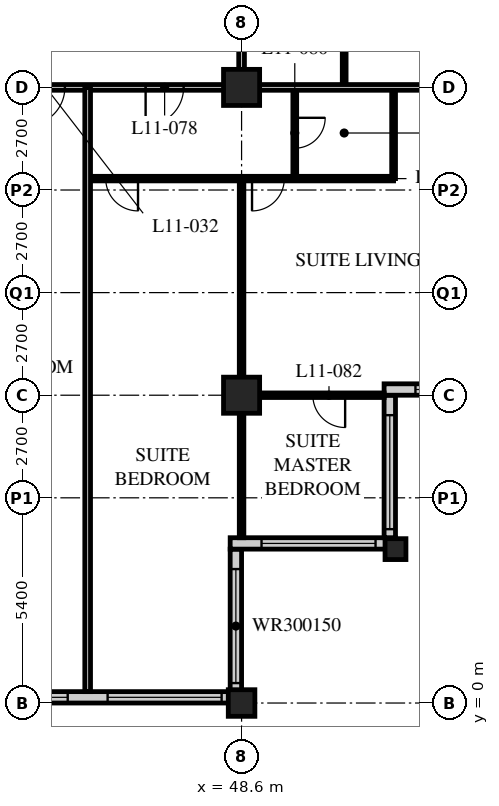
"""IFC4 building model, lengths in metres.
Left out: names, types, materials, properties, quantities, classifications, styles, units other than length and angle.
Written with IfcOpenShell. Run it as: python <this file> out.ifc"""

import sys

from ifc_helpers import new_model, si_unit, direction, frame, frame_2d, origin, origin_2d, place, context, subcontext, project, spatial, rectangle, hollow_rectangle, extrude, element, fill, save


model = new_model("IFC4")
c1 = context("Model", 3, precision=1e-05, world=origin(), true_north=direction((0.0, 1.0)))
c2 = subcontext(c1, "Body", "Model", "MODEL_VIEW")
j1 = project(units=[si_unit("LENGTHUNIT", "METRE"), si_unit("PLANEANGLEUNIT", "RADIAN")], contexts=[c1])
p1 = place(None, origin())
s1 = spatial("IfcSite", under=j1, at=p1, CompositionType="ELEMENT")
p2 = place(p1, origin())
s2 = spatial("IfcBuilding", under=s1, at=p2, CompositionType="ELEMENT")
p3 = place(p2, frame((0.0, 0.0, 50.0)))
s3 = spatial("IfcBuildingStorey", under=s2, at=p3, CompositionType="ELEMENT", Elevation=50.0)
p4 = place(p3, frame((48.6, 0.0, 0.0), z_axis=(0.0, 0.0, 1.0), x_axis=(1.0, 0.0, 0.0)))
e1 = element("IfcColumn", 1, at=p4, inside=s3, PredefinedType="COLUMN", context=c2, shape_type="SweptSolid", body=[
    extrude(hollow_rectangle(XDim=0.7, YDim=0.7, WallThickness=0.06, at=origin_2d()), origin(), (0.0, 0.0, 1.0), 3.4),
])
for number, where, z_axis, x_axis in (
    (2, (48.6, 8.1, 0.0), (0.0, 0.0, 1.0), (1.0, 0.0, 0.0)),
    (3, (48.6, 16.2, 0.0), (0.0, 0.0, 1.0), (1.0, 0.0, 0.0)),
):
    element("IfcColumn", number, at=place(p3, frame(where, z_axis=z_axis, x_axis=x_axis)), inside=s3, PredefinedType="COLUMN", context=c2, shape_type="SweptSolid", body=[
        extrude(hollow_rectangle(XDim=0.95, YDim=0.95, WallThickness=0.095, at=origin_2d()), origin(), (0.0, 0.0, 1.0), 3.4),
    ])
p5 = place(p3, frame((52.65, 4.05, 0.0), z_axis=(0.0, 0.0, 1.0), x_axis=(1.0, 0.0, 0.0)))
e4 = element("IfcColumn", 4, at=p5, inside=s3, PredefinedType="COLUMN", context=c2, shape_type="SweptSolid", body=[
    extrude(hollow_rectangle(XDim=0.55, YDim=0.55, WallThickness=0.05, at=origin_2d()), origin(), (0.0, 0.0, 1.0), 3.4),
])
p6 = place(p3, frame((8.4, 0.15, 0.0), z_axis=(0.0, 0.0, 1.0), x_axis=(1.0, 0.0, 0.0)))
e5 = element("IfcWall", 5, at=p6, inside=s3, PredefinedType="SOLIDWALL", context=c2, shape_type="SweptSolid", body=[
    extrude(rectangle(XDim=40.2, YDim=0.3, at=frame_2d((20.1, 0.0))), origin(), (0.0, 0.0, 1.0), 3.19),
])
p7 = place(p6, frame((0.225, 0.0, 0.9)))
e6 = element("IfcOpeningElement", 6, at=p7, cuts=e5, PredefinedType="OPENING", context=c2, shape_type="SweptSolid", body=[
    extrude(rectangle(XDim=3.0, YDim=2.0, at=frame_2d((1.5, 1.0))), frame((0.0, 0.16, 0.0), z_axis=(0.0, -1.0, 0.0), x_axis=(1.0, 0.0, 0.0)), (0.0, 0.0, 1.0), 0.32),
])
p8 = place(p6, frame((4.275, 0.0, 0.9)))
e7 = element("IfcOpeningElement", 7, at=p8, cuts=e5, PredefinedType="OPENING", context=c2, shape_type="SweptSolid", body=[
    extrude(rectangle(XDim=3.0, YDim=2.0, at=frame_2d((1.5, 1.0))), frame((0.0, 0.16, 0.0), z_axis=(0.0, -1.0, 0.0), x_axis=(1.0, 0.0, 0.0)), (0.0, 0.0, 1.0), 0.32),
])
p9 = place(p6, frame((8.325, 0.0, 0.9)))
e8 = element("IfcOpeningElement", 8, at=p9, cuts=e5, PredefinedType="OPENING", context=c2, shape_type="SweptSolid", body=[
    extrude(rectangle(XDim=3.0, YDim=2.0, at=frame_2d((1.5, 1.0))), frame((0.0, 0.16, 0.0), z_axis=(0.0, -1.0, 0.0), x_axis=(1.0, 0.0, 0.0)), (0.0, 0.0, 1.0), 0.32),
])
p10 = place(p6, frame((12.375, 0.0, 0.9)))
e9 = element("IfcOpeningElement", 9, at=p10, cuts=e5, PredefinedType="OPENING", context=c2, shape_type="SweptSolid", body=[
    extrude(rectangle(XDim=3.0, YDim=2.0, at=frame_2d((1.5, 1.0))), frame((0.0, 0.16, 0.0), z_axis=(0.0, -1.0, 0.0), x_axis=(1.0, 0.0, 0.0)), (0.0, 0.0, 1.0), 0.32),
])
p11 = place(p6, frame((16.425, 0.0, 0.9)))
e10 = element("IfcOpeningElement", 10, at=p11, cuts=e5, PredefinedType="OPENING", context=c2, shape_type="SweptSolid", body=[
    extrude(rectangle(XDim=3.0, YDim=2.0, at=frame_2d((1.5, 1.0))), frame((0.0, 0.16, 0.0), z_axis=(0.0, -1.0, 0.0), x_axis=(1.0, 0.0, 0.0)), (0.0, 0.0, 1.0), 0.32),
])
p12 = place(p6, frame((20.475, 0.0, 0.9)))
e11 = element("IfcOpeningElement", 11, at=p12, cuts=e5, PredefinedType="OPENING", context=c2, shape_type="SweptSolid", body=[
    extrude(rectangle(XDim=3.0, YDim=2.0, at=frame_2d((1.5, 1.0))), frame((0.0, 0.16, 0.0), z_axis=(0.0, -1.0, 0.0), x_axis=(1.0, 0.0, 0.0)), (0.0, 0.0, 1.0), 0.32),
])
p13 = place(p6, frame((24.525, 0.0, 0.9)))
e12 = element("IfcOpeningElement", 12, at=p13, cuts=e5, PredefinedType="OPENING", context=c2, shape_type="SweptSolid", body=[
    extrude(rectangle(XDim=3.0, YDim=2.0, at=frame_2d((1.5, 1.0))), frame((0.0, 0.16, 0.0), z_axis=(0.0, -1.0, 0.0), x_axis=(1.0, 0.0, 0.0)), (0.0, 0.0, 1.0), 0.32),
])
p14 = place(p6, frame((28.575, 0.0, 0.9)))
e13 = element("IfcOpeningElement", 13, at=p14, cuts=e5, PredefinedType="OPENING", context=c2, shape_type="SweptSolid", body=[
    extrude(rectangle(XDim=3.0, YDim=2.0, at=frame_2d((1.5, 1.0))), frame((0.0, 0.16, 0.0), z_axis=(0.0, -1.0, 0.0), x_axis=(1.0, 0.0, 0.0)), (0.0, 0.0, 1.0), 0.32),
])
p15 = place(p6, frame((32.625, 0.0, 0.9)))
e14 = element("IfcOpeningElement", 14, at=p15, cuts=e5, PredefinedType="OPENING", context=c2, shape_type="SweptSolid", body=[
    extrude(rectangle(XDim=3.0, YDim=2.0, at=frame_2d((1.5, 1.0))), frame((0.0, 0.16, 0.0), z_axis=(0.0, -1.0, 0.0), x_axis=(1.0, 0.0, 0.0)), (0.0, 0.0, 1.0), 0.32),
])
p16 = place(p6, frame((36.675, 0.0, 0.9)))
e15 = element("IfcOpeningElement", 15, at=p16, cuts=e5, PredefinedType="OPENING", context=c2, shape_type="SweptSolid", body=[
    extrude(rectangle(XDim=3.0, YDim=2.0, at=frame_2d((1.5, 1.0))), frame((0.0, 0.16, 0.0), z_axis=(0.0, -1.0, 0.0), x_axis=(1.0, 0.0, 0.0)), (0.0, 0.0, 1.0), 0.32),
])
p17 = place(p3, frame((48.45, 0.3, 0.0), z_axis=(0.0, 0.0, 1.0), x_axis=(0.0, 1.0, 0.0)))
e16 = element("IfcWall", 16, at=p17, inside=s3, PredefinedType="SOLIDWALL", context=c2, shape_type="SweptSolid", body=[
    extrude(rectangle(XDim=3.75, YDim=0.3, at=frame_2d((1.875, 0.0))), origin(), (0.0, 0.0, 1.0), 3.19),
])
p18 = place(p17, frame((0.225, 0.0, 0.9)))
e17 = element("IfcOpeningElement", 17, at=p18, cuts=e16, PredefinedType="OPENING", context=c2, shape_type="SweptSolid", body=[
    extrude(rectangle(XDim=3.0, YDim=1.5, at=frame_2d((1.5, 0.75))), frame((0.0, 0.16, 0.0), z_axis=(0.0, -1.0, 0.0), x_axis=(1.0, 0.0, 0.0)), (0.0, 0.0, 1.0), 0.32),
])
p19 = place(p3, frame((48.3, 4.2, 0.0), z_axis=(0.0, 0.0, 1.0), x_axis=(1.0, 0.0, 0.0)))
e18 = element("IfcWall", 18, at=p19, inside=s3, PredefinedType="SOLIDWALL", context=c2, shape_type="SweptSolid", body=[
    extrude(rectangle(XDim=4.35, YDim=0.3, at=frame_2d((2.175, 0.0))), origin(), (0.0, 0.0, 1.0), 3.19),
])
p20 = place(p19, frame((0.825, 0.0, 0.9)))
e19 = element("IfcOpeningElement", 19, at=p20, cuts=e18, PredefinedType="OPENING", context=c2, shape_type="SweptSolid", body=[
    extrude(rectangle(XDim=3.0, YDim=1.5, at=frame_2d((1.5, 0.75))), frame((0.0, 0.16, 0.0), z_axis=(0.0, -1.0, 0.0), x_axis=(1.0, 0.0, 0.0)), (0.0, 0.0, 1.0), 0.32),
])
p21 = place(p3, frame((52.5, 4.35, 0.0), z_axis=(0.0, 0.0, 1.0), x_axis=(0.0, 1.0, 0.0)))
e20 = element("IfcWall", 20, at=p21, inside=s3, PredefinedType="SOLIDWALL", context=c2, shape_type="SweptSolid", body=[
    extrude(rectangle(XDim=3.75, YDim=0.3, at=frame_2d((1.875, 0.0))), origin(), (0.0, 0.0, 1.0), 3.19),
])
p22 = place(p21, frame((0.225, 0.0, 0.9)))
e21 = element("IfcOpeningElement", 21, at=p22, cuts=e20, PredefinedType="OPENING", context=c2, shape_type="SweptSolid", body=[
    extrude(rectangle(XDim=3.0, YDim=1.5, at=frame_2d((1.5, 0.75))), frame((0.0, 0.16, 0.0), z_axis=(0.0, -1.0, 0.0), x_axis=(1.0, 0.0, 0.0)), (0.0, 0.0, 1.0), 0.32),
])
p23 = place(p3, frame((52.35, 8.25, 0.0), z_axis=(0.0, 0.0, 1.0), x_axis=(1.0, 0.0, 0.0)))
e22 = element("IfcWall", 22, at=p23, inside=s3, PredefinedType="SOLIDWALL", context=c2, shape_type="SweptSolid", body=[
    extrude(rectangle(XDim=4.35, YDim=0.3, at=frame_2d((2.175, 0.0))), origin(), (0.0, 0.0, 1.0), 3.19),
])
p24 = place(p23, frame((0.825, 0.0, 0.9)))
e23 = element("IfcOpeningElement", 23, at=p24, cuts=e22, PredefinedType="OPENING", context=c2, shape_type="SweptSolid", body=[
    extrude(rectangle(XDim=3.0, YDim=1.5, at=frame_2d((1.5, 0.75))), frame((0.0, 0.16, 0.0), z_axis=(0.0, -1.0, 0.0), x_axis=(1.0, 0.0, 0.0)), (0.0, 0.0, 1.0), 0.32),
])
p25 = place(p3, frame((8.1, 16.2, 0.0), z_axis=(0.0, 0.0, 1.0), x_axis=(1.0, 0.0, 0.0)))
e24 = element("IfcWall", 24, at=p25, inside=s3, PredefinedType="PARTITIONING", context=c2, shape_type="SweptSolid", body=[
    extrude(rectangle(XDim=40.5, YDim=0.15, at=frame_2d((20.25, 0.0))), origin(), (0.0, 0.0, 1.0), 2.578),
])
p26 = place(p25, frame((4.35, 0.0, 0.0)))
e25 = element("IfcOpeningElement", 25, at=p26, cuts=e24, PredefinedType="OPENING", context=c2, shape_type="SweptSolid", body=[
    extrude(rectangle(XDim=1.0, YDim=2.1, at=frame_2d((0.5, 1.05))), frame((0.0, 0.085, 0.0), z_axis=(0.0, -1.0, 0.0), x_axis=(1.0, 0.0, 0.0)), (0.0, 0.0, 1.0), 0.17),
])
p27 = place(p25, frame((10.85, 0.0, 0.0)))
e26 = element("IfcOpeningElement", 26, at=p27, cuts=e24, PredefinedType="OPENING", context=c2, shape_type="SweptSolid", body=[
    extrude(rectangle(XDim=1.0, YDim=2.1, at=frame_2d((0.5, 1.05))), frame((0.0, 0.085, 0.0), z_axis=(0.0, -1.0, 0.0), x_axis=(1.0, 0.0, 0.0)), (0.0, 0.0, 1.0), 0.17),
])
p28 = place(p25, frame((12.75, 0.0, 0.0)))
e27 = element("IfcOpeningElement", 27, at=p28, cuts=e24, PredefinedType="OPENING", context=c2, shape_type="SweptSolid", body=[
    extrude(rectangle(XDim=1.0, YDim=2.1, at=frame_2d((0.5, 1.05))), frame((0.0, 0.085, 0.0), z_axis=(0.0, -1.0, 0.0), x_axis=(1.0, 0.0, 0.0)), (0.0, 0.0, 1.0), 0.17),
])
p29 = place(p25, frame((18.95, 0.0, 0.0)))
e28 = element("IfcOpeningElement", 28, at=p29, cuts=e24, PredefinedType="OPENING", context=c2, shape_type="SweptSolid", body=[
    extrude(rectangle(XDim=1.0, YDim=2.1, at=frame_2d((0.5, 1.05))), frame((0.0, 0.085, 0.0), z_axis=(0.0, -1.0, 0.0), x_axis=(1.0, 0.0, 0.0)), (0.0, 0.0, 1.0), 0.17),
])
p30 = place(p25, frame((20.55, 0.0, 0.0)))
e29 = element("IfcOpeningElement", 29, at=p30, cuts=e24, PredefinedType="OPENING", context=c2, shape_type="SweptSolid", body=[
    extrude(rectangle(XDim=1.0, YDim=2.1, at=frame_2d((0.5, 1.05))), frame((0.0, 0.085, 0.0), z_axis=(0.0, -1.0, 0.0), x_axis=(1.0, 0.0, 0.0)), (0.0, 0.0, 1.0), 0.17),
])
p31 = place(p25, frame((27.05, 0.0, 0.0)))
e30 = element("IfcOpeningElement", 30, at=p31, cuts=e24, PredefinedType="OPENING", context=c2, shape_type="SweptSolid", body=[
    extrude(rectangle(XDim=1.0, YDim=2.1, at=frame_2d((0.5, 1.05))), frame((0.0, 0.085, 0.0), z_axis=(0.0, -1.0, 0.0), x_axis=(1.0, 0.0, 0.0)), (0.0, 0.0, 1.0), 0.17),
])
p32 = place(p25, frame((28.95, 0.0, 0.0)))
e31 = element("IfcOpeningElement", 31, at=p32, cuts=e24, PredefinedType="OPENING", context=c2, shape_type="SweptSolid", body=[
    extrude(rectangle(XDim=1.0, YDim=2.1, at=frame_2d((0.5, 1.05))), frame((0.0, 0.085, 0.0), z_axis=(0.0, -1.0, 0.0), x_axis=(1.0, 0.0, 0.0)), (0.0, 0.0, 1.0), 0.17),
])
p33 = place(p25, frame((34.85, 0.0, 0.0)))
e32 = element("IfcOpeningElement", 32, at=p33, cuts=e24, PredefinedType="OPENING", context=c2, shape_type="SweptSolid", body=[
    extrude(rectangle(XDim=1.0, YDim=2.1, at=frame_2d((0.5, 1.05))), frame((0.0, 0.085, 0.0), z_axis=(0.0, -1.0, 0.0), x_axis=(1.0, 0.0, 0.0)), (0.0, 0.0, 1.0), 0.17),
])
p34 = place(p25, frame((1.525, 0.0, 0.0)))
e33 = element("IfcOpeningElement", 33, at=p34, cuts=e24, PredefinedType="OPENING", context=c2, shape_type="SweptSolid", body=[
    extrude(rectangle(XDim=1.0, YDim=2.1, at=frame_2d((0.5, 1.05))), frame((0.0, 0.085, 0.0), z_axis=(0.0, -1.0, 0.0), x_axis=(1.0, 0.0, 0.0)), (0.0, 0.0, 1.0), 0.17),
])
p35 = place(p25, frame((37.975, 0.0, 0.0)))
e34 = element("IfcOpeningElement", 34, at=p35, cuts=e24, PredefinedType="OPENING", context=c2, shape_type="SweptSolid", body=[
    extrude(rectangle(XDim=1.0, YDim=2.1, at=frame_2d((0.5, 1.05))), frame((0.0, 0.085, 0.0), z_axis=(0.0, -1.0, 0.0), x_axis=(1.0, 0.0, 0.0)), (0.0, 0.0, 1.0), 0.17),
])
p36 = place(p3, frame((48.6, 16.2, 0.0), z_axis=(0.0, 0.0, 1.0), x_axis=(0.0, 1.0, 0.0)))
e35 = element("IfcWall", 35, at=p36, inside=s3, PredefinedType="PARTITIONING", context=c2, shape_type="SweptSolid", body=[
    extrude(rectangle(XDim=26.1, YDim=0.15, at=frame_2d((13.05, 0.0))), origin(), (0.0, 0.0, 1.0), 2.578),
])
p37 = place(p36, frame((2.75, 0.0, 0.0)))
e36 = element("IfcOpeningElement", 36, at=p37, cuts=e35, PredefinedType="OPENING", context=c2, shape_type="SweptSolid", body=[
    extrude(rectangle(XDim=1.0, YDim=2.1, at=frame_2d((0.5, 1.05))), frame((0.0, 0.085, 0.0), z_axis=(0.0, -1.0, 0.0), x_axis=(1.0, 0.0, 0.0)), (0.0, 0.0, 1.0), 0.17),
])
p38 = place(p36, frame((4.35, 0.0, 0.0)))
e37 = element("IfcOpeningElement", 37, at=p38, cuts=e35, PredefinedType="OPENING", context=c2, shape_type="SweptSolid", body=[
    extrude(rectangle(XDim=1.0, YDim=2.1, at=frame_2d((0.5, 1.05))), frame((0.0, 0.085, 0.0), z_axis=(0.0, -1.0, 0.0), x_axis=(1.0, 0.0, 0.0)), (0.0, 0.0, 1.0), 0.17),
])
p39 = place(p36, frame((10.85, 0.0, 0.0)))
e38 = element("IfcOpeningElement", 38, at=p39, cuts=e35, PredefinedType="OPENING", context=c2, shape_type="SweptSolid", body=[
    extrude(rectangle(XDim=1.0, YDim=2.1, at=frame_2d((0.5, 1.05))), frame((0.0, 0.085, 0.0), z_axis=(0.0, -1.0, 0.0), x_axis=(1.0, 0.0, 0.0)), (0.0, 0.0, 1.0), 0.17),
])
p40 = place(p36, frame((12.45, 0.0, 0.0)))
e39 = element("IfcOpeningElement", 39, at=p40, cuts=e35, PredefinedType="OPENING", context=c2, shape_type="SweptSolid", body=[
    extrude(rectangle(XDim=1.0, YDim=2.1, at=frame_2d((0.5, 1.05))), frame((0.0, 0.085, 0.0), z_axis=(0.0, -1.0, 0.0), x_axis=(1.0, 0.0, 0.0)), (0.0, 0.0, 1.0), 0.17),
])
p41 = place(p36, frame((18.65, 0.0, 0.0)))
e40 = element("IfcOpeningElement", 40, at=p41, cuts=e35, PredefinedType="OPENING", context=c2, shape_type="SweptSolid", body=[
    extrude(rectangle(XDim=1.0, YDim=2.1, at=frame_2d((0.5, 1.05))), frame((0.0, 0.085, 0.0), z_axis=(0.0, -1.0, 0.0), x_axis=(1.0, 0.0, 0.0)), (0.0, 0.0, 1.0), 0.17),
])
p42 = place(p36, frame((22.7, 0.0, 0.0)))
e41 = element("IfcOpeningElement", 41, at=p42, cuts=e35, PredefinedType="OPENING", context=c2, shape_type="SweptSolid", body=[
    extrude(rectangle(XDim=1.0, YDim=2.1, at=frame_2d((0.5, 1.05))), frame((0.0, 0.085, 0.0), z_axis=(0.0, -1.0, 0.0), x_axis=(1.0, 0.0, 0.0)), (0.0, 0.0, 1.0), 0.17),
])
p43 = place(p3, frame((51.3, 16.2, 0.0), z_axis=(0.0, 0.0, 1.0), x_axis=(0.0, 1.0, 0.0)))
e42 = element("IfcWall", 42, at=p43, inside=s3, PredefinedType="PARTITIONING", context=c2, shape_type="SweptSolid", body=[
    extrude(rectangle(XDim=2.6, YDim=0.1, at=frame_2d((1.3, 0.0))), origin(), (0.0, 0.0, 1.0), 3.19),
])
p44 = place(p3, frame((44.55, 13.8, 0.0), z_axis=(0.0, 0.0, 1.0), x_axis=(1.0, 0.0, 0.0)))
e43 = element("IfcWall", 43, at=p44, inside=s3, PredefinedType="PARTITIONING", context=c2, shape_type="SweptSolid", body=[
    extrude(rectangle(XDim=8.05, YDim=0.12, at=frame_2d((4.025, 0.0))), origin(), (0.0, 0.0, 1.0), 3.19),
])
p45 = place(p44, frame((0.475, 0.0, 0.0)))
e44 = element("IfcOpeningElement", 44, at=p45, cuts=e43, PredefinedType="OPENING", context=c2, shape_type="SweptSolid", body=[
    extrude(rectangle(XDim=0.85, YDim=2.1, at=frame_2d((0.425, 1.05))), frame((0.0, 0.07, 0.0), z_axis=(0.0, -1.0, 0.0), x_axis=(1.0, 0.0, 0.0)), (0.0, 0.0, 1.0), 0.14),
])
p46 = place(p44, frame((4.325, 0.0, 0.0)))
e45 = element("IfcOpeningElement", 45, at=p46, cuts=e43, PredefinedType="OPENING", context=c2, shape_type="SweptSolid", body=[
    extrude(rectangle(XDim=0.85, YDim=2.1, at=frame_2d((0.425, 1.05))), frame((0.0, 0.07, 0.0), z_axis=(0.0, -1.0, 0.0), x_axis=(1.0, 0.0, 0.0)), (0.0, 0.0, 1.0), 0.14),
])
p47 = place(p3, frame((50.0, 16.2, 0.0), z_axis=(0.0, 0.0, 1.0), x_axis=(0.0, -1.0, 0.0)))
e46 = element("IfcWall", 46, at=p47, inside=s3, PredefinedType="PARTITIONING", context=c2, shape_type="SweptSolid", body=[
    extrude(rectangle(XDim=2.4, YDim=0.1, at=frame_2d((1.2, 0.0))), origin(), (0.0, 0.0, 1.0), 3.19),
])
p48 = place(p47, frame((0.8, 0.0, 0.0)))
e47 = element("IfcOpeningElement", 47, at=p48, cuts=e46, PredefinedType="OPENING", context=c2, shape_type="SweptSolid", body=[
    extrude(rectangle(XDim=0.8, YDim=2.1, at=frame_2d((0.4, 1.05))), frame((0.0, 0.06, 0.0), z_axis=(0.0, -1.0, 0.0), x_axis=(1.0, 0.0, 0.0)), (0.0, 0.0, 1.0), 0.12),
])
p49 = place(p3, frame((52.6, 16.2, 0.0), z_axis=(0.0, 0.0, 1.0), x_axis=(0.0, -1.0, 0.0)))
e48 = element("IfcWall", 48, at=p49, inside=s3, PredefinedType="PARTITIONING", context=c2, shape_type="SweptSolid", body=[
    extrude(rectangle(XDim=2.4, YDim=0.1, at=frame_2d((1.2, 0.0))), origin(), (0.0, 0.0, 1.0), 3.19),
])
p50 = place(p3, frame((48.6, 13.8, 0.0), z_axis=(0.0, 0.0, 1.0), x_axis=(0.0, -1.0, 0.0)))
e49 = element("IfcWall", 49, at=p50, inside=s3, PredefinedType="PARTITIONING", context=c2, shape_type="SweptSolid", body=[
    extrude(rectangle(XDim=9.45, YDim=0.12, at=frame_2d((4.725, 0.0))), origin(), (0.0, 0.0, 1.0), 2.578),
])
p51 = place(p3, frame((48.6, 8.1, 0.0), z_axis=(0.0, 0.0, 1.0), x_axis=(1.0, 0.0, 0.0)))
e50 = element("IfcWall", 50, at=p51, inside=s3, PredefinedType="PARTITIONING", context=c2, shape_type="SweptSolid", body=[
    extrude(rectangle(XDim=3.75, YDim=0.12, at=frame_2d((1.875, 0.0))), origin(), (0.0, 0.0, 1.0), 2.578),
])
p52 = place(p51, frame((1.875, 0.0, 0.0)))
e51 = element("IfcOpeningElement", 51, at=p52, cuts=e50, PredefinedType="OPENING", context=c2, shape_type="SweptSolid", body=[
    extrude(rectangle(XDim=0.85, YDim=2.1, at=frame_2d((0.425, 1.05))), frame((0.0, 0.07, 0.0), z_axis=(0.0, -1.0, 0.0), x_axis=(1.0, 0.0, 0.0)), (0.0, 0.0, 1.0), 0.14),
])
p53 = place(p3, frame((48.6, 16.2, 0.0), z_axis=(0.0, 0.0, 1.0), x_axis=(1.0, 0.0, 0.0)))
e52 = element("IfcWall", 52, at=p53, inside=s3, PredefinedType="PARTITIONING", context=c2, shape_type="SweptSolid", body=[
    extrude(rectangle(XDim=7.8, YDim=0.15, at=frame_2d((3.9, 0.0))), origin(), (0.0, 0.0, 1.0), 2.578),
])
p54 = place(p3, frame((44.55, 16.2, 0.0), z_axis=(0.0, 0.0, 1.0), x_axis=(0.0, -1.0, 0.0)))
e53 = element("IfcWall", 53, at=p54, inside=s3, PredefinedType="PARTITIONING", context=c2, shape_type="SweptSolid", body=[
    extrude(rectangle(XDim=15.9, YDim=0.15, at=frame_2d((7.95, 0.0))), origin(), (0.0, 0.0, 1.0), 3.19),
])
p55 = place(p15, origin())
e54 = element("IfcWindow", 54, at=p55, inside=s3, PartitioningType="SINGLE_PANEL", PredefinedType="WINDOW", context=c2, shape_type="SweptSolid", body=[
    extrude(rectangle(XDim=3.0, YDim=2.0, at=frame_2d((1.5, 1.0))), frame((0.0, 0.03, 0.0), z_axis=(0.0, -1.0, 0.0), x_axis=(1.0, 0.0, 0.0)), (0.0, 0.0, 1.0), 0.06),
])
fill(e14, e54)
p56 = place(p16, origin())
e55 = element("IfcWindow", 55, at=p56, inside=s3, PartitioningType="SINGLE_PANEL", PredefinedType="WINDOW", context=c2, shape_type="SweptSolid", body=[
    extrude(rectangle(XDim=3.0, YDim=2.0, at=frame_2d((1.5, 1.0))), frame((0.0, 0.03, 0.0), z_axis=(0.0, -1.0, 0.0), x_axis=(1.0, 0.0, 0.0)), (0.0, 0.0, 1.0), 0.06),
])
fill(e15, e55)
p57 = place(p18, origin())
e56 = element("IfcWindow", 56, at=p57, inside=s3, PartitioningType="SINGLE_PANEL", PredefinedType="WINDOW", context=c2, shape_type="SweptSolid", body=[
    extrude(rectangle(XDim=3.0, YDim=1.5, at=frame_2d((1.5, 0.75))), frame((0.0, 0.03, 0.0), z_axis=(0.0, -1.0, 0.0), x_axis=(1.0, 0.0, 0.0)), (0.0, 0.0, 1.0), 0.06),
])
fill(e17, e56)
p58 = place(p20, origin())
e57 = element("IfcWindow", 57, at=p58, inside=s3, PartitioningType="SINGLE_PANEL", PredefinedType="WINDOW", context=c2, shape_type="SweptSolid", body=[
    extrude(rectangle(XDim=3.0, YDim=1.5, at=frame_2d((1.5, 0.75))), frame((0.0, 0.03, 0.0), z_axis=(0.0, -1.0, 0.0), x_axis=(1.0, 0.0, 0.0)), (0.0, 0.0, 1.0), 0.06),
])
fill(e19, e57)
p59 = place(p22, origin())
e58 = element("IfcWindow", 58, at=p59, inside=s3, PartitioningType="SINGLE_PANEL", PredefinedType="WINDOW", context=c2, shape_type="SweptSolid", body=[
    extrude(rectangle(XDim=3.0, YDim=1.5, at=frame_2d((1.5, 0.75))), frame((0.0, 0.03, 0.0), z_axis=(0.0, -1.0, 0.0), x_axis=(1.0, 0.0, 0.0)), (0.0, 0.0, 1.0), 0.06),
])
fill(e21, e58)
p60 = place(p24, origin())
e59 = element("IfcWindow", 59, at=p60, inside=s3, PartitioningType="SINGLE_PANEL", PredefinedType="WINDOW", context=c2, shape_type="SweptSolid", body=[
    extrude(rectangle(XDim=3.0, YDim=1.5, at=frame_2d((1.5, 0.75))), frame((0.0, 0.03, 0.0), z_axis=(0.0, -1.0, 0.0), x_axis=(1.0, 0.0, 0.0)), (0.0, 0.0, 1.0), 0.06),
])
fill(e23, e59)
p61 = place(p33, origin())
e60 = element("IfcDoor", 60, at=p61, inside=s3, OperationType="SINGLE_SWING_RIGHT", PredefinedType="DOOR", context=c2, shape_type="SweptSolid", body=[
    extrude(rectangle(XDim=1.0, YDim=2.1, at=frame_2d((0.5, 1.05))), frame((0.0, 0.025, 0.0), z_axis=(0.0, -1.0, 0.0), x_axis=(1.0, 0.0, 0.0)), (0.0, 0.0, 1.0), 0.05),
])
fill(e32, e60)
p62 = place(p35, origin())
e61 = element("IfcDoor", 61, at=p62, inside=s3, OperationType="SINGLE_SWING_RIGHT", PredefinedType="DOOR", context=c2, shape_type="SweptSolid", body=[
    extrude(rectangle(XDim=1.0, YDim=2.1, at=frame_2d((0.5, 1.05))), frame((0.0, 0.025, 0.0), z_axis=(0.0, -1.0, 0.0), x_axis=(1.0, 0.0, 0.0)), (0.0, 0.0, 1.0), 0.05),
])
fill(e34, e61)
p63 = place(p45, origin())
e62 = element("IfcDoor", 62, at=p63, inside=s3, OperationType="SINGLE_SWING_LEFT", PredefinedType="DOOR", context=c2, shape_type="SweptSolid", body=[
    extrude(rectangle(XDim=0.85, YDim=2.1, at=frame_2d((0.425, 1.05))), frame((0.0, 0.025, 0.0), z_axis=(0.0, -1.0, 0.0), x_axis=(1.0, 0.0, 0.0)), (0.0, 0.0, 1.0), 0.05),
])
fill(e44, e62)
p64 = place(p48, origin())
e63 = element("IfcDoor", 63, at=p64, inside=s3, OperationType="SINGLE_SWING_LEFT", PredefinedType="DOOR", context=c2, shape_type="SweptSolid", body=[
    extrude(rectangle(XDim=0.8, YDim=2.1, at=frame_2d((0.4, 1.05))), frame((0.0, 0.025, 0.0), z_axis=(0.0, -1.0, 0.0), x_axis=(1.0, 0.0, 0.0)), (0.0, 0.0, 1.0), 0.05),
])
fill(e47, e63)
p65 = place(p46, origin())
e64 = element("IfcDoor", 64, at=p65, inside=s3, OperationType="SINGLE_SWING_RIGHT", PredefinedType="DOOR", context=c2, shape_type="SweptSolid", body=[
    extrude(rectangle(XDim=0.85, YDim=2.1, at=frame_2d((0.425, 1.05))), frame((0.0, 0.025, 0.0), z_axis=(0.0, -1.0, 0.0), x_axis=(1.0, 0.0, 0.0)), (0.0, 0.0, 1.0), 0.05),
])
fill(e45, e64)
p66 = place(p52, origin())
e65 = element("IfcDoor", 65, at=p66, inside=s3, OperationType="SINGLE_SWING_LEFT", PredefinedType="DOOR", context=c2, shape_type="SweptSolid", body=[
    extrude(rectangle(XDim=0.85, YDim=2.1, at=frame_2d((0.425, 1.05))), frame((0.0, 0.025, 0.0), z_axis=(0.0, -1.0, 0.0), x_axis=(1.0, 0.0, 0.0)), (0.0, 0.0, 1.0), 0.05),
])
fill(e51, e65)
save(model, sys.argv[1])
